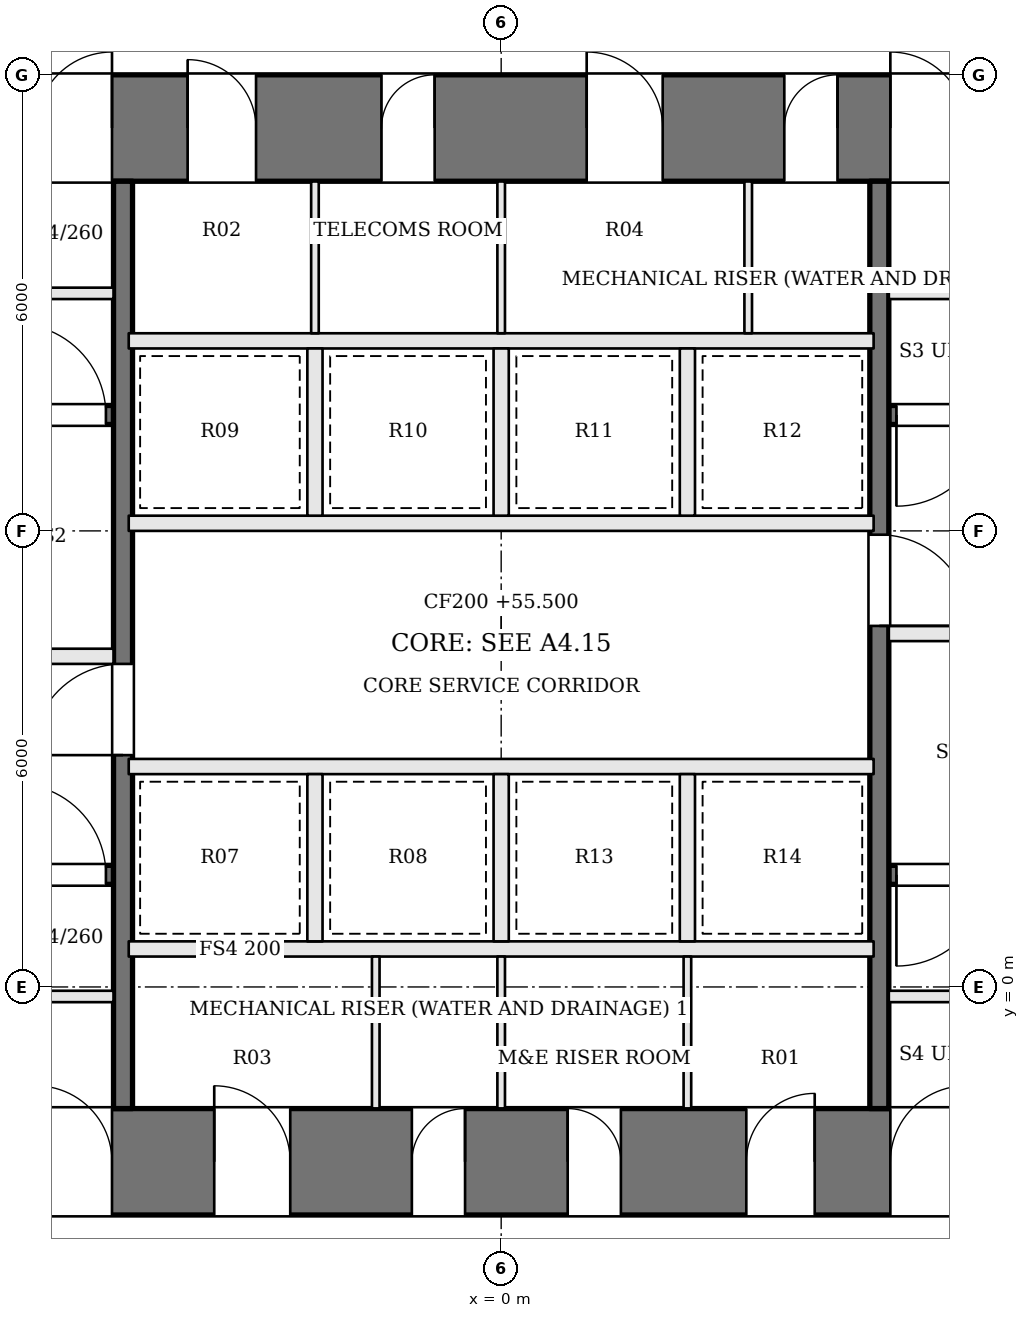
"""IFC4 building model, lengths in metres.
Left out: names, types, materials, properties, quantities, classifications, styles, units other than length and angle.
Written with IfcOpenShell. Run it as: python <this file> out.ifc"""

import sys

from ifc_helpers import new_model, si_unit, direction, frame, frame_2d, origin, place, context, subcontext, project, spatial, rectangle, extrude, element, fill, save


model = new_model("IFC4")
c1 = context("Model", 3, precision=1e-05, world=origin(), true_north=direction((0.0, 1.0)))
c2 = subcontext(c1, "Body", "Model", "MODEL_VIEW")
j1 = project(units=[si_unit("LENGTHUNIT", "METRE"), si_unit("PLANEANGLEUNIT", "RADIAN")], contexts=[c1])
p1 = place(None, origin())
s1 = spatial("IfcSite", under=j1, at=p1, CompositionType="ELEMENT")
p2 = place(p1, origin())
s2 = spatial("IfcBuilding", under=s1, at=p2, CompositionType="ELEMENT")
p3 = place(p2, frame((0.0, 0.0, 55.5)))
s3 = spatial("IfcBuildingStorey", under=s2, at=p3, CompositionType="ELEMENT", Elevation=55.5)
p4 = place(p3, frame((-13.0, 11.3, 0.0), z_axis=(0.0, 0.0, 1.0), x_axis=(1.0, 0.0, 0.0)))
e1 = element("IfcWall", 1, at=p4, inside=s3, PredefinedType="SHEAR", context=c2, shape_type="SweptSolid", body=[
    extrude(rectangle(XDim=26.0, YDim=1.4, at=frame_2d((13.0, 0.0))), origin(), (0.0, 0.0, 1.0), 3.6),
])
p5 = place(p4, frame((8.875, 0.0, 0.0)))
e2 = element("IfcOpeningElement", 2, at=p5, cuts=e1, PredefinedType="OPENING", context=c2, shape_type="SweptSolid", body=[
    extrude(rectangle(XDim=0.9, YDim=2.1, at=frame_2d((0.45, 1.05))), frame((0.0, 0.71, 0.0), z_axis=(0.0, -1.0, 0.0), x_axis=(1.0, 0.0, 0.0)), (0.0, 0.0, 1.0), 1.42),
])
p6 = place(p4, frame((11.425, 0.0, 0.0)))
e3 = element("IfcOpeningElement", 3, at=p6, cuts=e1, PredefinedType="OPENING", context=c2, shape_type="SweptSolid", body=[
    extrude(rectangle(XDim=0.7, YDim=2.1, at=frame_2d((0.35, 1.05))), frame((0.0, 0.71, 0.0), z_axis=(0.0, -1.0, 0.0), x_axis=(1.0, 0.0, 0.0)), (0.0, 0.0, 1.0), 1.42),
])
p7 = place(p4, frame((14.125, 0.0, 0.0)))
e4 = element("IfcOpeningElement", 4, at=p7, cuts=e1, PredefinedType="OPENING", context=c2, shape_type="SweptSolid", body=[
    extrude(rectangle(XDim=1.0, YDim=2.1, at=frame_2d((0.5, 1.05))), frame((0.0, 0.71, 0.0), z_axis=(0.0, -1.0, 0.0), x_axis=(1.0, 0.0, 0.0)), (0.0, 0.0, 1.0), 1.42),
])
p8 = place(p4, frame((16.725, 0.0, 0.0)))
e5 = element("IfcOpeningElement", 5, at=p8, cuts=e1, PredefinedType="OPENING", context=c2, shape_type="SweptSolid", body=[
    extrude(rectangle(XDim=0.7, YDim=2.1, at=frame_2d((0.35, 1.05))), frame((0.0, 0.71, 0.0), z_axis=(0.0, -1.0, 0.0), x_axis=(1.0, 0.0, 0.0)), (0.0, 0.0, 1.0), 1.42),
])
p9 = place(p4, frame((6.88, 0.0, 0.0)))
e6 = element("IfcOpeningElement", 6, at=p9, cuts=e1, PredefinedType="OPENING", context=c2, shape_type="SweptSolid", body=[
    extrude(rectangle(XDim=1.0, YDim=2.1, at=frame_2d((0.5, 1.05))), frame((0.0, 0.71, 0.0), z_axis=(0.0, -1.0, 0.0), x_axis=(1.0, 0.0, 0.0)), (0.0, 0.0, 1.0), 1.42),
])
p10 = place(p4, frame((18.12, 0.0, 0.0)))
e7 = element("IfcOpeningElement", 7, at=p10, cuts=e1, PredefinedType="OPENING", context=c2, shape_type="SweptSolid", body=[
    extrude(rectangle(XDim=1.0, YDim=2.1, at=frame_2d((0.5, 1.05))), frame((0.0, 0.71, 0.0), z_axis=(0.0, -1.0, 0.0), x_axis=(1.0, 0.0, 0.0)), (0.0, 0.0, 1.0), 1.42),
])
p11 = place(p3, frame((-13.0, -2.3, 0.0), z_axis=(0.0, 0.0, 1.0), x_axis=(1.0, 0.0, 0.0)))
e8 = element("IfcWall", 8, at=p11, inside=s3, PredefinedType="SHEAR", context=c2, shape_type="SweptSolid", body=[
    extrude(rectangle(XDim=26.0, YDim=1.4, at=frame_2d((13.0, 0.0))), origin(), (0.0, 0.0, 1.0), 3.6),
])
p12 = place(p11, frame((9.225, 0.0, 0.0)))
e9 = element("IfcOpeningElement", 9, at=p12, cuts=e8, PredefinedType="OPENING", context=c2, shape_type="SweptSolid", body=[
    extrude(rectangle(XDim=1.0, YDim=2.1, at=frame_2d((0.5, 1.05))), frame((0.0, 0.71, 0.0), z_axis=(0.0, -1.0, 0.0), x_axis=(1.0, 0.0, 0.0)), (0.0, 0.0, 1.0), 1.42),
])
p13 = place(p11, frame((11.825, 0.0, 0.0)))
e10 = element("IfcOpeningElement", 10, at=p13, cuts=e8, PredefinedType="OPENING", context=c2, shape_type="SweptSolid", body=[
    extrude(rectangle(XDim=0.7, YDim=2.1, at=frame_2d((0.35, 1.05))), frame((0.0, 0.71, 0.0), z_axis=(0.0, -1.0, 0.0), x_axis=(1.0, 0.0, 0.0)), (0.0, 0.0, 1.0), 1.42),
])
p14 = place(p11, frame((13.875, 0.0, 0.0)))
e11 = element("IfcOpeningElement", 11, at=p14, cuts=e8, PredefinedType="OPENING", context=c2, shape_type="SweptSolid", body=[
    extrude(rectangle(XDim=0.7, YDim=2.1, at=frame_2d((0.35, 1.05))), frame((0.0, 0.71, 0.0), z_axis=(0.0, -1.0, 0.0), x_axis=(1.0, 0.0, 0.0)), (0.0, 0.0, 1.0), 1.42),
])
p15 = place(p11, frame((16.225, 0.0, 0.0)))
e12 = element("IfcOpeningElement", 12, at=p15, cuts=e8, PredefinedType="OPENING", context=c2, shape_type="SweptSolid", body=[
    extrude(rectangle(XDim=0.9, YDim=2.1, at=frame_2d((0.45, 1.05))), frame((0.0, 0.71, 0.0), z_axis=(0.0, -1.0, 0.0), x_axis=(1.0, 0.0, 0.0)), (0.0, 0.0, 1.0), 1.42),
])
p16 = place(p11, frame((6.88, 0.0, 0.0)))
e13 = element("IfcOpeningElement", 13, at=p16, cuts=e8, PredefinedType="OPENING", context=c2, shape_type="SweptSolid", body=[
    extrude(rectangle(XDim=1.0, YDim=2.1, at=frame_2d((0.5, 1.05))), frame((0.0, 0.71, 0.0), z_axis=(0.0, -1.0, 0.0), x_axis=(1.0, 0.0, 0.0)), (0.0, 0.0, 1.0), 1.42),
])
p17 = place(p11, frame((18.12, 0.0, 0.0)))
e14 = element("IfcOpeningElement", 14, at=p17, cuts=e8, PredefinedType="OPENING", context=c2, shape_type="SweptSolid", body=[
    extrude(rectangle(XDim=1.0, YDim=2.1, at=frame_2d((0.5, 1.05))), frame((0.0, 0.71, 0.0), z_axis=(0.0, -1.0, 0.0), x_axis=(1.0, 0.0, 0.0)), (0.0, 0.0, 1.0), 1.42),
])
for number, where, z_axis, x_axis in (
    (15, (-6.4, -0.125, 0.0), (0.0, 0.0, 1.0), (1.0, 0.0, 0.0)),
    (16, (6.4, 9.125, 0.0), (0.0, 0.0, 1.0), (-1.0, 0.0, 0.0)),
    (17, (-6.4, 9.125, 0.0), (0.0, 0.0, 1.0), (1.0, 0.0, 0.0)),
    (18, (6.4, -0.125, 0.0), (0.0, 0.0, 1.0), (-1.0, 0.0, 0.0)),
):
    element("IfcWall", number, at=place(p3, frame(where, z_axis=z_axis, x_axis=x_axis)), inside=s3, PredefinedType="SOLIDWALL", context=c2, shape_type="SweptSolid", body=[
        extrude(rectangle(XDim=1.3, YDim=0.15, at=frame_2d((0.65, 0.0))), origin(), (0.0, 0.0, 1.0), 3.4),
    ])
p18 = place(p3, frame((-11.6, 1.475, 0.0), z_axis=(0.0, 0.0, 1.0), x_axis=(1.0, 0.0, 0.0)))
e19 = element("IfcWall", 19, at=p18, inside=s3, PredefinedType="SOLIDWALL", context=c2, shape_type="SweptSolid", body=[
    extrude(rectangle(XDim=6.5, YDim=0.25, at=frame_2d((3.25, 0.0))), origin(), (0.0, 0.0, 1.0), 3.4),
])
p19 = place(p18, frame((5.2, 0.0, 0.0)))
e20 = element("IfcOpeningElement", 20, at=p19, cuts=e19, PredefinedType="OPENING", context=c2, shape_type="SweptSolid", body=[
    extrude(rectangle(XDim=1.2, YDim=2.1, at=frame_2d((0.6, 1.05))), frame((0.0, 0.135, 0.0), z_axis=(0.0, -1.0, 0.0), x_axis=(1.0, 0.0, 0.0)), (0.0, 0.0, 1.0), 0.27),
])
p20 = place(p3, frame((11.6, 7.525, 0.0), z_axis=(0.0, 0.0, 1.0), x_axis=(-1.0, 0.0, 0.0)))
e21 = element("IfcWall", 21, at=p20, inside=s3, PredefinedType="SOLIDWALL", context=c2, shape_type="SweptSolid", body=[
    extrude(rectangle(XDim=6.5, YDim=0.25, at=frame_2d((3.25, 0.0))), origin(), (0.0, 0.0, 1.0), 3.4),
])
p21 = place(p20, frame((5.2, 0.0, 0.0)))
e22 = element("IfcOpeningElement", 22, at=p21, cuts=e21, PredefinedType="OPENING", context=c2, shape_type="SweptSolid", body=[
    extrude(rectangle(XDim=1.2, YDim=2.1, at=frame_2d((0.6, 1.05))), frame((0.0, 0.135, 0.0), z_axis=(0.0, -1.0, 0.0), x_axis=(1.0, 0.0, 0.0)), (0.0, 0.0, 1.0), 0.27),
])
p22 = place(p3, frame((-11.6, 4.35, 0.0), z_axis=(0.0, 0.0, 1.0), x_axis=(1.0, 0.0, 0.0)))
e23 = element("IfcWall", 23, at=p22, inside=s3, PredefinedType="SOLIDWALL", context=c2, shape_type="SweptSolid", body=[
    extrude(rectangle(XDim=6.5, YDim=0.2, at=frame_2d((3.25, 0.0))), origin(), (0.0, 0.0, 1.0), 3.4),
])
p23 = place(p22, frame((3.8, 0.0, 0.0)))
e24 = element("IfcOpeningElement", 24, at=p23, cuts=e23, PredefinedType="OPENING", context=c2, shape_type="SweptSolid", body=[
    extrude(rectangle(XDim=1.2, YDim=2.1, at=frame_2d((0.6, 1.05))), frame((0.0, 0.11, 0.0), z_axis=(0.0, -1.0, 0.0), x_axis=(1.0, 0.0, 0.0)), (0.0, 0.0, 1.0), 0.22),
])
p24 = place(p22, frame((0.5, 0.0, 0.0)))
e25 = element("IfcOpeningElement", 25, at=p24, cuts=e23, PredefinedType="OPENING", context=c2, shape_type="SweptSolid", body=[
    extrude(rectangle(XDim=1.2, YDim=2.1, at=frame_2d((0.6, 1.05))), frame((0.0, 0.11, 0.0), z_axis=(0.0, -1.0, 0.0), x_axis=(1.0, 0.0, 0.0)), (0.0, 0.0, 1.0), 0.22),
])
p25 = place(p3, frame((11.6, 4.65, 0.0), z_axis=(0.0, 0.0, 1.0), x_axis=(-1.0, 0.0, 0.0)))
e26 = element("IfcWall", 26, at=p25, inside=s3, PredefinedType="SOLIDWALL", context=c2, shape_type="SweptSolid", body=[
    extrude(rectangle(XDim=6.5, YDim=0.2, at=frame_2d((3.25, 0.0))), origin(), (0.0, 0.0, 1.0), 3.4),
])
p26 = place(p25, frame((3.8, 0.0, 0.0)))
e27 = element("IfcOpeningElement", 27, at=p26, cuts=e26, PredefinedType="OPENING", context=c2, shape_type="SweptSolid", body=[
    extrude(rectangle(XDim=1.2, YDim=2.1, at=frame_2d((0.6, 1.05))), frame((0.0, 0.11, 0.0), z_axis=(0.0, -1.0, 0.0), x_axis=(1.0, 0.0, 0.0)), (0.0, 0.0, 1.0), 0.22),
])
p27 = place(p25, frame((0.5, 0.0, 0.0)))
e28 = element("IfcOpeningElement", 28, at=p27, cuts=e26, PredefinedType="OPENING", context=c2, shape_type="SweptSolid", body=[
    extrude(rectangle(XDim=1.2, YDim=2.1, at=frame_2d((0.6, 1.05))), frame((0.0, 0.11, 0.0), z_axis=(0.0, -1.0, 0.0), x_axis=(1.0, 0.0, 0.0)), (0.0, 0.0, 1.0), 0.22),
])
p28 = place(p3, frame((-11.6, 7.525, 0.0), z_axis=(0.0, 0.0, 1.0), x_axis=(1.0, 0.0, 0.0)))
e29 = element("IfcWall", 29, at=p28, inside=s3, PredefinedType="SOLIDWALL", context=c2, shape_type="SweptSolid", body=[
    extrude(rectangle(XDim=6.5, YDim=0.25, at=frame_2d((3.25, 0.0))), origin(), (0.0, 0.0, 1.0), 3.4),
])
p29 = place(p28, frame((5.2, 0.0, 0.0)))
e30 = element("IfcOpeningElement", 30, at=p29, cuts=e29, PredefinedType="OPENING", context=c2, shape_type="SweptSolid", body=[
    extrude(rectangle(XDim=1.2, YDim=2.1, at=frame_2d((0.6, 1.05))), frame((0.0, 0.135, 0.0), z_axis=(0.0, -1.0, 0.0), x_axis=(1.0, 0.0, 0.0)), (0.0, 0.0, 1.0), 0.27),
])
p30 = place(p3, frame((11.6, 1.475, 0.0), z_axis=(0.0, 0.0, 1.0), x_axis=(-1.0, 0.0, 0.0)))
e31 = element("IfcWall", 31, at=p30, inside=s3, PredefinedType="SOLIDWALL", context=c2, shape_type="SweptSolid", body=[
    extrude(rectangle(XDim=6.5, YDim=0.25, at=frame_2d((3.25, 0.0))), origin(), (0.0, 0.0, 1.0), 3.4),
])
p31 = place(p30, frame((5.2, 0.0, 0.0)))
e32 = element("IfcOpeningElement", 32, at=p31, cuts=e31, PredefinedType="OPENING", context=c2, shape_type="SweptSolid", body=[
    extrude(rectangle(XDim=1.2, YDim=2.1, at=frame_2d((0.6, 1.05))), frame((0.0, 0.135, 0.0), z_axis=(0.0, -1.0, 0.0), x_axis=(1.0, 0.0, 0.0)), (0.0, 0.0, 1.0), 0.27),
])
p32 = place(p3, frame((-4.975, -1.6, 0.0), z_axis=(0.0, 0.0, 1.0), x_axis=(0.0, 1.0, 0.0)))
e33 = element("IfcWall", 33, at=p32, inside=s3, PredefinedType="SOLIDWALL", context=c2, shape_type="SweptSolid", body=[
    extrude(rectangle(XDim=12.2, YDim=0.25, at=frame_2d((6.1, 0.0))), origin(), (0.0, 0.0, 1.0), 3.4),
])
p33 = place(p32, frame((4.65, 0.0, 0.0)))
e34 = element("IfcOpeningElement", 34, at=p33, cuts=e33, PredefinedType="OPENING", context=c2, shape_type="SweptSolid", body=[
    extrude(rectangle(XDim=1.2, YDim=2.1, at=frame_2d((0.6, 1.05))), frame((0.0, 0.135, 0.0), z_axis=(0.0, -1.0, 0.0), x_axis=(1.0, 0.0, 0.0)), (0.0, 0.0, 1.0), 0.27),
])
p34 = place(p3, frame((4.975, 10.6, 0.0), z_axis=(0.0, 0.0, 1.0), x_axis=(0.0, -1.0, 0.0)))
e35 = element("IfcWall", 35, at=p34, inside=s3, PredefinedType="SOLIDWALL", context=c2, shape_type="SweptSolid", body=[
    extrude(rectangle(XDim=12.2, YDim=0.25, at=frame_2d((6.1, 0.0))), origin(), (0.0, 0.0, 1.0), 3.4),
])
p35 = place(p34, frame((4.65, 0.0, 0.0)))
e36 = element("IfcOpeningElement", 36, at=p35, cuts=e35, PredefinedType="OPENING", context=c2, shape_type="SweptSolid", body=[
    extrude(rectangle(XDim=1.2, YDim=2.1, at=frame_2d((0.6, 1.05))), frame((0.0, 0.135, 0.0), z_axis=(0.0, -1.0, 0.0), x_axis=(1.0, 0.0, 0.0)), (0.0, 0.0, 1.0), 0.27),
])
for number, where, z_axis, x_axis in (
    (37, (-4.9, 0.5, 0.0), (0.0, 0.0, 1.0), (1.0, 0.0, 0.0)),
    (38, (-4.9, 2.9, 0.0), (0.0, 0.0, 1.0), (1.0, 0.0, 0.0)),
    (39, (-4.9, 6.1, 0.0), (0.0, 0.0, 1.0), (1.0, 0.0, 0.0)),
    (40, (-4.9, 8.5, 0.0), (0.0, 0.0, 1.0), (1.0, 0.0, 0.0)),
):
    element("IfcWall", number, at=place(p3, frame(where, z_axis=z_axis, x_axis=x_axis)), inside=s3, PredefinedType="SOLIDWALL", context=c2, shape_type="SweptSolid", body=[
        extrude(rectangle(XDim=9.8, YDim=0.2, at=frame_2d((4.9, 0.0))), origin(), (0.0, 0.0, 1.0), 3.4),
    ])
for number, where, z_axis, x_axis in (
    (41, (-2.45, 0.6, 0.0), (0.0, 0.0, 1.0), (0.0, 1.0, 0.0)),
    (42, (0.0, 0.6, 0.0), (0.0, 0.0, 1.0), (0.0, 1.0, 0.0)),
    (43, (2.45, 0.6, 0.0), (0.0, 0.0, 1.0), (0.0, 1.0, 0.0)),
    (44, (-2.45, 6.2, 0.0), (0.0, 0.0, 1.0), (0.0, 1.0, 0.0)),
    (45, (0.0, 6.2, 0.0), (0.0, 0.0, 1.0), (0.0, 1.0, 0.0)),
    (46, (2.45, 6.2, 0.0), (0.0, 0.0, 1.0), (0.0, 1.0, 0.0)),
):
    element("IfcWall", number, at=place(p3, frame(where, z_axis=z_axis, x_axis=x_axis)), inside=s3, PredefinedType="SOLIDWALL", context=c2, shape_type="SweptSolid", body=[
        extrude(rectangle(XDim=2.2, YDim=0.2, at=frame_2d((1.1, 0.0))), origin(), (0.0, 0.0, 1.0), 3.4),
    ])
for number, where, z_axis, x_axis in (
    (47, (-1.65, -1.6, 0.0), (0.0, 0.0, 1.0), (0.0, 1.0, 0.0)),
    (48, (0.0, -1.6, 0.0), (0.0, 0.0, 1.0), (0.0, 1.0, 0.0)),
    (49, (2.45, -1.6, 0.0), (0.0, 0.0, 1.0), (0.0, 1.0, 0.0)),
    (50, (-2.45, 8.6, 0.0), (0.0, 0.0, 1.0), (0.0, 1.0, 0.0)),
    (51, (0.0, 8.6, 0.0), (0.0, 0.0, 1.0), (0.0, 1.0, 0.0)),
    (52, (3.25, 8.6, 0.0), (0.0, 0.0, 1.0), (0.0, 1.0, 0.0)),
):
    element("IfcWall", number, at=place(p3, frame(where, z_axis=z_axis, x_axis=x_axis)), inside=s3, PredefinedType="PARTITIONING", context=c2, shape_type="SweptSolid", body=[
        extrude(rectangle(XDim=2.0, YDim=0.1, at=frame_2d((1.0, 0.0))), origin(), (0.0, 0.0, 1.0), 3.4),
    ])
p36 = place(p33, origin())
e53 = element("IfcDoor", 53, at=p36, inside=s3, OperationType="SINGLE_SWING_LEFT", PredefinedType="DOOR", context=c2, shape_type="SweptSolid", body=[
    extrude(rectangle(XDim=1.2, YDim=2.1, at=frame_2d((0.6, 1.05))), frame((0.0, 0.025, 0.0), z_axis=(0.0, -1.0, 0.0), x_axis=(1.0, 0.0, 0.0)), (0.0, 0.0, 1.0), 0.05),
])
fill(e34, e53)
p37 = place(p35, origin())
e54 = element("IfcDoor", 54, at=p37, inside=s3, OperationType="SINGLE_SWING_RIGHT", PredefinedType="DOOR", context=c2, shape_type="SweptSolid", body=[
    extrude(rectangle(XDim=1.2, YDim=2.1, at=frame_2d((0.6, 1.05))), frame((0.0, 0.025, 0.0), z_axis=(0.0, -1.0, 0.0), x_axis=(1.0, 0.0, 0.0)), (0.0, 0.0, 1.0), 0.05),
])
fill(e36, e54)
p38 = place(p19, origin())
e55 = element("IfcDoor", 55, at=p38, inside=s3, OperationType="SINGLE_SWING_LEFT", PredefinedType="DOOR", context=c2, shape_type="SweptSolid", body=[
    extrude(rectangle(XDim=1.2, YDim=2.1, at=frame_2d((0.6, 1.05))), frame((0.0, 0.025, 0.0), z_axis=(0.0, -1.0, 0.0), x_axis=(1.0, 0.0, 0.0)), (0.0, 0.0, 1.0), 0.05),
])
fill(e20, e55)
p39 = place(p21, origin())
e56 = element("IfcDoor", 56, at=p39, inside=s3, OperationType="SINGLE_SWING_RIGHT", PredefinedType="DOOR", context=c2, shape_type="SweptSolid", body=[
    extrude(rectangle(XDim=1.2, YDim=2.1, at=frame_2d((0.6, 1.05))), frame((0.0, 0.025, 0.0), z_axis=(0.0, -1.0, 0.0), x_axis=(1.0, 0.0, 0.0)), (0.0, 0.0, 1.0), 0.05),
])
fill(e22, e56)
p40 = place(p29, origin())
e57 = element("IfcDoor", 57, at=p40, inside=s3, OperationType="SINGLE_SWING_LEFT", PredefinedType="DOOR", context=c2, shape_type="SweptSolid", body=[
    extrude(rectangle(XDim=1.2, YDim=2.1, at=frame_2d((0.6, 1.05))), frame((0.0, 0.025, 0.0), z_axis=(0.0, -1.0, 0.0), x_axis=(1.0, 0.0, 0.0)), (0.0, 0.0, 1.0), 0.05),
])
fill(e30, e57)
p41 = place(p31, origin())
e58 = element("IfcDoor", 58, at=p41, inside=s3, OperationType="SINGLE_SWING_RIGHT", PredefinedType="DOOR", context=c2, shape_type="SweptSolid", body=[
    extrude(rectangle(XDim=1.2, YDim=2.1, at=frame_2d((0.6, 1.05))), frame((0.0, 0.025, 0.0), z_axis=(0.0, -1.0, 0.0), x_axis=(1.0, 0.0, 0.0)), (0.0, 0.0, 1.0), 0.05),
])
fill(e32, e58)
p42 = place(p12, origin())
e59 = element("IfcDoor", 59, at=p42, inside=s3, OperationType="SINGLE_SWING_LEFT", PredefinedType="DOOR", context=c2, shape_type="SweptSolid", body=[
    extrude(rectangle(XDim=1.0, YDim=2.1, at=frame_2d((0.5, 1.05))), frame((0.0, 0.025, 0.0), z_axis=(0.0, -1.0, 0.0), x_axis=(1.0, 0.0, 0.0)), (0.0, 0.0, 1.0), 0.05),
])
fill(e9, e59)
p43 = place(p13, origin())
e60 = element("IfcDoor", 60, at=p43, inside=s3, OperationType="SINGLE_SWING_RIGHT", PredefinedType="DOOR", context=c2, shape_type="SweptSolid", body=[
    extrude(rectangle(XDim=0.7, YDim=2.1, at=frame_2d((0.35, 1.05))), frame((0.0, 0.025, 0.0), z_axis=(0.0, -1.0, 0.0), x_axis=(1.0, 0.0, 0.0)), (0.0, 0.0, 1.0), 0.05),
])
fill(e10, e60)
p44 = place(p14, origin())
e61 = element("IfcDoor", 61, at=p44, inside=s3, OperationType="SINGLE_SWING_LEFT", PredefinedType="DOOR", context=c2, shape_type="SweptSolid", body=[
    extrude(rectangle(XDim=0.7, YDim=2.1, at=frame_2d((0.35, 1.05))), frame((0.0, 0.025, 0.0), z_axis=(0.0, -1.0, 0.0), x_axis=(1.0, 0.0, 0.0)), (0.0, 0.0, 1.0), 0.05),
])
fill(e11, e61)
p45 = place(p15, origin())
e62 = element("IfcDoor", 62, at=p45, inside=s3, OperationType="SINGLE_SWING_RIGHT", PredefinedType="DOOR", context=c2, shape_type="SweptSolid", body=[
    extrude(rectangle(XDim=0.9, YDim=2.1, at=frame_2d((0.45, 1.05))), frame((0.0, 0.025, 0.0), z_axis=(0.0, -1.0, 0.0), x_axis=(1.0, 0.0, 0.0)), (0.0, 0.0, 1.0), 0.05),
])
fill(e12, e62)
p46 = place(p5, origin())
e63 = element("IfcDoor", 63, at=p46, inside=s3, OperationType="SINGLE_SWING_LEFT", PredefinedType="DOOR", context=c2, shape_type="SweptSolid", body=[
    extrude(rectangle(XDim=0.9, YDim=2.1, at=frame_2d((0.45, 1.05))), frame((0.0, 0.025, 0.0), z_axis=(0.0, -1.0, 0.0), x_axis=(1.0, 0.0, 0.0)), (0.0, 0.0, 1.0), 0.05),
])
fill(e2, e63)
p47 = place(p6, origin())
e64 = element("IfcDoor", 64, at=p47, inside=s3, OperationType="SINGLE_SWING_RIGHT", PredefinedType="DOOR", context=c2, shape_type="SweptSolid", body=[
    extrude(rectangle(XDim=0.7, YDim=2.1, at=frame_2d((0.35, 1.05))), frame((0.0, 0.025, 0.0), z_axis=(0.0, -1.0, 0.0), x_axis=(1.0, 0.0, 0.0)), (0.0, 0.0, 1.0), 0.05),
])
fill(e3, e64)
p48 = place(p7, origin())
e65 = element("IfcDoor", 65, at=p48, inside=s3, OperationType="SINGLE_SWING_LEFT", PredefinedType="DOOR", context=c2, shape_type="SweptSolid", body=[
    extrude(rectangle(XDim=1.0, YDim=2.1, at=frame_2d((0.5, 1.05))), frame((0.0, 0.025, 0.0), z_axis=(0.0, -1.0, 0.0), x_axis=(1.0, 0.0, 0.0)), (0.0, 0.0, 1.0), 0.05),
])
fill(e4, e65)
p49 = place(p8, origin())
e66 = element("IfcDoor", 66, at=p49, inside=s3, OperationType="SINGLE_SWING_RIGHT", PredefinedType="DOOR", context=c2, shape_type="SweptSolid", body=[
    extrude(rectangle(XDim=0.7, YDim=2.1, at=frame_2d((0.35, 1.05))), frame((0.0, 0.025, 0.0), z_axis=(0.0, -1.0, 0.0), x_axis=(1.0, 0.0, 0.0)), (0.0, 0.0, 1.0), 0.05),
])
fill(e5, e66)
p50 = place(p16, origin())
e67 = element("IfcDoor", 67, at=p50, inside=s3, OperationType="SINGLE_SWING_LEFT", PredefinedType="DOOR", context=c2, shape_type="SweptSolid", body=[
    extrude(rectangle(XDim=1.0, YDim=2.1, at=frame_2d((0.5, 1.05))), frame((0.0, 0.025, 0.0), z_axis=(0.0, -1.0, 0.0), x_axis=(1.0, 0.0, 0.0)), (0.0, 0.0, 1.0), 0.05),
])
fill(e13, e67)
p51 = place(p9, origin())
e68 = element("IfcDoor", 68, at=p51, inside=s3, OperationType="SINGLE_SWING_RIGHT", PredefinedType="DOOR", context=c2, shape_type="SweptSolid", body=[
    extrude(rectangle(XDim=1.0, YDim=2.1, at=frame_2d((0.5, 1.05))), frame((0.0, 0.025, 0.0), z_axis=(0.0, -1.0, 0.0), x_axis=(1.0, 0.0, 0.0)), (0.0, 0.0, 1.0), 0.05),
])
fill(e6, e68)
p52 = place(p10, origin())
e69 = element("IfcDoor", 69, at=p52, inside=s3, OperationType="SINGLE_SWING_LEFT", PredefinedType="DOOR", context=c2, shape_type="SweptSolid", body=[
    extrude(rectangle(XDim=1.0, YDim=2.1, at=frame_2d((0.5, 1.05))), frame((0.0, 0.025, 0.0), z_axis=(0.0, -1.0, 0.0), x_axis=(1.0, 0.0, 0.0)), (0.0, 0.0, 1.0), 0.05),
])
fill(e7, e69)
p53 = place(p17, origin())
e70 = element("IfcDoor", 70, at=p53, inside=s3, OperationType="SINGLE_SWING_RIGHT", PredefinedType="DOOR", context=c2, shape_type="SweptSolid", body=[
    extrude(rectangle(XDim=1.0, YDim=2.1, at=frame_2d((0.5, 1.05))), frame((0.0, 0.025, 0.0), z_axis=(0.0, -1.0, 0.0), x_axis=(1.0, 0.0, 0.0)), (0.0, 0.0, 1.0), 0.05),
])
fill(e14, e70)
save(model, sys.argv[1])
